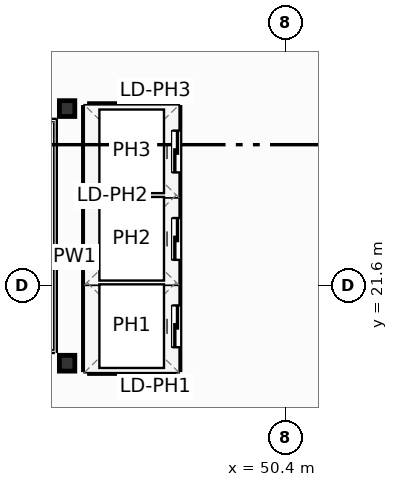
"""IFC4 building model, lengths in metres.
Left out: names, types, materials, properties, quantities, classifications, styles, units other than length and angle.
Written with IfcOpenShell. Run it as: python <this file> out.ifc"""

import sys

from ifc_helpers import new_model, si_unit, direction, frame, frame_2d, origin, origin_2d, place, context, subcontext, project, spatial, rectangle, i_section, extrude, element, fill, save


model = new_model("IFC4")
c1 = context("Model", 3, precision=1e-05, world=origin(), true_north=direction((0.0, 1.0)))
c2 = subcontext(c1, "Body", "Model", "MODEL_VIEW")
j1 = project(units=[si_unit("LENGTHUNIT", "METRE"), si_unit("PLANEANGLEUNIT", "RADIAN")], contexts=[c1])
p1 = place(None, origin())
s1 = spatial("IfcSite", under=j1, at=p1, CompositionType="ELEMENT")
p2 = place(p1, origin())
s2 = spatial("IfcBuilding", under=s1, at=p2, CompositionType="ELEMENT")
p3 = place(p2, frame((0.0, 0.0, 265.6)))
s3 = spatial("IfcBuildingStorey", under=s2, at=p3, CompositionType="ELEMENT", Elevation=265.6)
for number, where, z_axis, x_axis in (
    (1, (44.65, 19.55, 0.0), (0.0, 0.0, 1.0), (1.0, 0.0, 0.0)),
    (2, (44.65, 26.25, 0.0), (0.0, 0.0, 1.0), (1.0, 0.0, 0.0)),
):
    element("IfcColumn", number, at=place(p3, frame(where, z_axis=z_axis, x_axis=x_axis)), inside=s3, PredefinedType="COLUMN", context=c2, shape_type="SweptSolid", body=[
        extrude(i_section(OverallWidth=0.406, OverallDepth=0.416, WebThickness=0.03, FlangeThickness=0.048, FilletRadius=0.025, at=origin_2d()), origin(), (0.0, 0.0, 1.0), 3.7),
    ])
for number, where, z_axis, x_axis in (
    (3, (45.24, 21.675, 0.0), (0.0, 0.0, 1.0), (1.0, 0.0, 0.0)),
    (4, (45.24, 23.975, 0.0), (0.0, 0.0, 1.0), (1.0, 0.0, 0.0)),
):
    element("IfcWall", number, at=place(p3, frame(where, z_axis=z_axis, x_axis=x_axis)), inside=s3, PredefinedType="PARTITIONING", context=c2, shape_type="SweptSolid", body=[
        extrude(rectangle(XDim=2.22, YDim=0.2, at=frame_2d((1.11, 0.0))), origin(), (0.0, 0.0, 1.0), 3.45),
    ])
p4 = place(p3, frame((45.24, 19.38, 0.0), z_axis=(0.0, 0.0, 1.0), x_axis=(1.0, 0.0, 0.0)))
e5 = element("IfcWall", 5, at=p4, inside=s3, PredefinedType="PARTITIONING", context=c2, shape_type="SweptSolid", body=[
    extrude(rectangle(XDim=2.22, YDim=0.2, at=frame_2d((1.11, 0.0))), origin(), (0.0, 0.0, 1.0), 2.662),
])
p5 = place(p3, frame((45.24, 26.28, 0.0), z_axis=(0.0, 0.0, 1.0), x_axis=(1.0, 0.0, 0.0)))
e6 = element("IfcWall", 6, at=p5, inside=s3, PredefinedType="PARTITIONING", context=c2, shape_type="SweptSolid", body=[
    extrude(rectangle(XDim=2.22, YDim=0.2, at=frame_2d((1.11, 0.0))), origin(), (0.0, 0.0, 1.0), 3.45),
])
p6 = place(p3, frame((45.18, 19.38, 0.0), z_axis=(0.0, 0.0, 1.0), x_axis=(0.0, 1.0, 0.0)))
e7 = element("IfcWall", 7, at=p6, inside=s3, PredefinedType="PARTITIONING", context=c2, shape_type="SweptSolid", body=[
    extrude(rectangle(XDim=6.9, YDim=0.2, at=frame_2d((3.45, 0.0))), origin(), (0.0, 0.0, 1.0), 3.45),
])
p7 = place(p3, frame((47.52, 19.38, 0.0), z_axis=(0.0, 0.0, 1.0), x_axis=(0.0, 1.0, 0.0)))
e8 = element("IfcWall", 8, at=p7, inside=s3, PredefinedType="PARTITIONING", context=c2, shape_type="SweptSolid", body=[
    extrude(rectangle(XDim=6.9, YDim=0.2, at=frame_2d((3.45, 0.0))), origin(), (0.0, 0.0, 1.0), 3.45),
])
p8 = place(p7, frame((0.59, 0.0, 0.0)))
e9 = element("IfcOpeningElement", 9, at=p8, cuts=e8, PredefinedType="OPENING", context=c2, shape_type="SweptSolid", body=[
    extrude(rectangle(XDim=1.1, YDim=2.15, at=frame_2d((0.55, 1.075))), frame((0.0, 0.11, 0.0), z_axis=(0.0, -1.0, 0.0), x_axis=(1.0, 0.0, 0.0)), (0.0, 0.0, 1.0), 0.22),
])
p9 = place(p7, frame((2.89, 0.0, 0.0)))
e10 = element("IfcOpeningElement", 10, at=p9, cuts=e8, PredefinedType="OPENING", context=c2, shape_type="SweptSolid", body=[
    extrude(rectangle(XDim=1.1, YDim=2.15, at=frame_2d((0.55, 1.075))), frame((0.0, 0.11, 0.0), z_axis=(0.0, -1.0, 0.0), x_axis=(1.0, 0.0, 0.0)), (0.0, 0.0, 1.0), 0.22),
])
p10 = place(p7, frame((5.19, 0.0, 0.0)))
e11 = element("IfcOpeningElement", 11, at=p10, cuts=e8, PredefinedType="OPENING", context=c2, shape_type="SweptSolid", body=[
    extrude(rectangle(XDim=1.1, YDim=2.15, at=frame_2d((0.55, 1.075))), frame((0.0, 0.11, 0.0), z_axis=(0.0, -1.0, 0.0), x_axis=(1.0, 0.0, 0.0)), (0.0, 0.0, 1.0), 0.22),
])
p11 = place(p8, origin())
e12 = element("IfcDoor", 12, at=p11, inside=s3, OperationType="SLIDING_TO_LEFT", PredefinedType="DOOR", context=c2, shape_type="SweptSolid", body=[
    extrude(rectangle(XDim=1.1, YDim=2.15, at=frame_2d((0.55, 1.075))), frame((0.0, 0.025, 0.0), z_axis=(0.0, -1.0, 0.0), x_axis=(1.0, 0.0, 0.0)), (0.0, 0.0, 1.0), 0.05),
])
fill(e9, e12)
p12 = place(p9, origin())
e13 = element("IfcDoor", 13, at=p12, inside=s3, OperationType="SLIDING_TO_LEFT", PredefinedType="DOOR", context=c2, shape_type="SweptSolid", body=[
    extrude(rectangle(XDim=1.1, YDim=2.15, at=frame_2d((0.55, 1.075))), frame((0.0, 0.025, 0.0), z_axis=(0.0, -1.0, 0.0), x_axis=(1.0, 0.0, 0.0)), (0.0, 0.0, 1.0), 0.05),
])
fill(e10, e13)
p13 = place(p10, origin())
e14 = element("IfcDoor", 14, at=p13, inside=s3, OperationType="SLIDING_TO_LEFT", PredefinedType="DOOR", context=c2, shape_type="SweptSolid", body=[
    extrude(rectangle(XDim=1.1, YDim=2.15, at=frame_2d((0.55, 1.075))), frame((0.0, 0.025, 0.0), z_axis=(0.0, -1.0, 0.0), x_axis=(1.0, 0.0, 0.0)), (0.0, 0.0, 1.0), 0.05),
])
fill(e11, e14)
save(model, sys.argv[1])
